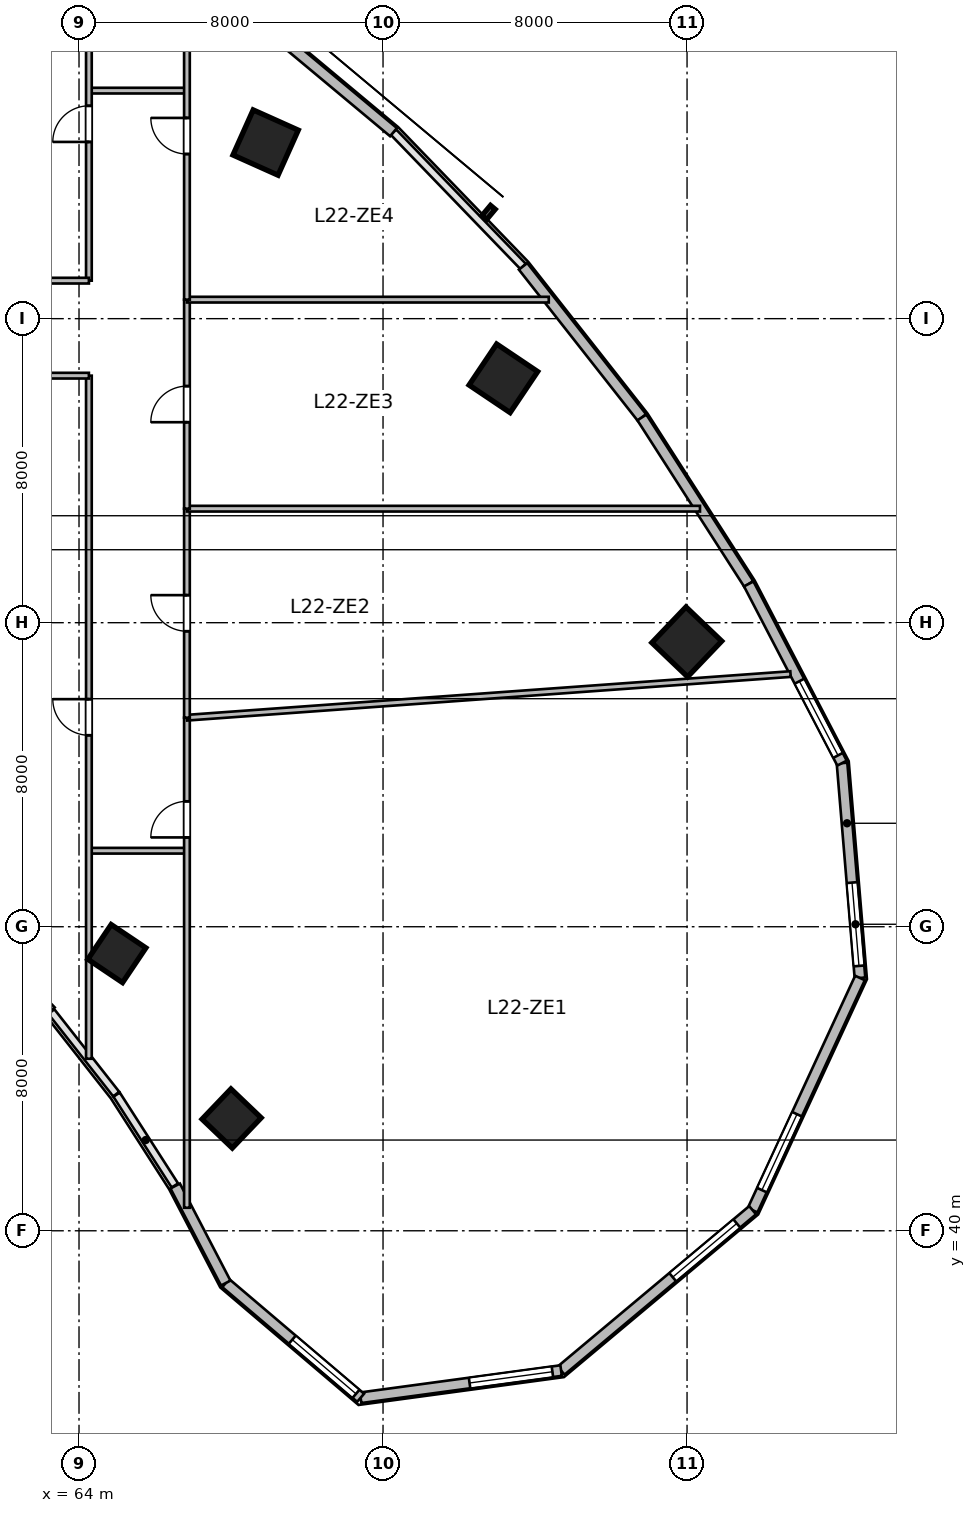
"""IFC4 building model, lengths in metres.
Left out: names, types, materials, properties, quantities, classifications, styles, units other than length and angle.
Written with IfcOpenShell. Run it as: python <this file> out.ifc"""

import sys

from ifc_helpers import new_model, si_unit, direction, frame, frame_2d, origin, origin_2d, place, context, subcontext, project, spatial, rectangle, extrude, source, transform, mapped, element, fill, save


model = new_model("IFC4")
c1 = context("Model", 3, precision=1e-05, world=origin(), true_north=direction((0.0, 1.0)))
c2 = subcontext(c1, "Body", "Model", "MODEL_VIEW")
j1 = project(units=[si_unit("LENGTHUNIT", "METRE"), si_unit("PLANEANGLEUNIT", "RADIAN")], contexts=[c1])
p1 = place(None, origin())
s1 = spatial("IfcSite", under=j1, at=p1, CompositionType="ELEMENT")
p2 = place(p1, origin())
s2 = spatial("IfcBuilding", under=s1, at=p2, CompositionType="ELEMENT")
p3 = place(p2, frame((0.0, 0.0, 96.0)))
s3 = spatial("IfcBuildingStorey", under=s2, at=p3, CompositionType="ELEMENT", Elevation=96.0)
m1 = source(origin(), c2, "Body", "SweptSolid", [
    extrude(rectangle(XDim=1.3, YDim=1.3, at=origin_2d()), origin(), (0.0, 0.0, 1.0), 3.9),
])
p4 = place(p3, frame((68.91, 68.633, 0.0), z_axis=(0.0, 0.0, 1.0), x_axis=(0.409126902895, 0.912477494148, 0.0)))
e1 = element("IfcColumn", 1, at=p4, inside=s3, PredefinedType="COLUMN", context=c2, shape_type="MappedRepresentation", body=[
    mapped(m1, transform((0.0, 0.0, 0.0), scale=1.0)),
])
m2 = source(origin(), c2, "Body", "SweptSolid", [
    extrude(rectangle(XDim=1.1, YDim=1.1, at=origin_2d()), origin(), (0.0, 0.0, 1.0), 3.9),
])
p5 = place(p3, frame((64.996, 47.294, 0.0), z_axis=(0.0, 0.0, 1.0), x_axis=(0.55774510898, 0.830012285095, 0.0)))
e2 = element("IfcColumn", 2, at=p5, inside=s3, PredefinedType="COLUMN", context=c2, shape_type="MappedRepresentation", body=[
    mapped(m2, transform((0.0, 0.0, 0.0), scale=1.0)),
])
p6 = place(p3, frame((75.167, 62.43, 0.0), z_axis=(0.0, 0.0, 1.0), x_axis=(0.55774510898, 0.830012285095, 0.0)))
e3 = element("IfcColumn", 3, at=p6, inside=s3, PredefinedType="COLUMN", context=c2, shape_type="MappedRepresentation", body=[
    mapped(m1, transform((0.0, 0.0, 0.0), scale=1.0)),
])
p7 = place(p3, frame((68.015, 42.955, 0.0), z_axis=(0.0, 0.0, 1.0), x_axis=(0.690756218984, 0.723087716626, 0.0)))
e4 = element("IfcColumn", 4, at=p7, inside=s3, PredefinedType="COLUMN", context=c2, shape_type="MappedRepresentation", body=[
    mapped(m2, transform((0.0, 0.0, 0.0), scale=1.0)),
])
p8 = place(p3, frame((79.993, 55.494, 0.0), z_axis=(0.0, 0.0, 1.0), x_axis=(0.690756218984, 0.723087716626, 0.0)))
e5 = element("IfcColumn", 5, at=p8, inside=s3, PredefinedType="COLUMN", context=c2, shape_type="MappedRepresentation", body=[
    mapped(m1, transform((0.0, 0.0, 0.0), scale=1.0)),
])
m3 = source(origin(), c2, "Body", "SweptSolid", [
    extrude(rectangle(XDim=5.674, YDim=0.28, at=frame_2d((2.837, 0.0))), origin(), (0.0, 0.0, 1.0), 3.65),
])
p9 = place(p3, frame((84.078, 52.305, 0.0), z_axis=(0.0, 0.0, 1.0), x_axis=(0.083309007867, -0.996523762491, 0.0)))
e6 = element("IfcWall", 6, at=p9, inside=s3, PredefinedType="SOLIDWALL", context=c2, shape_type="MappedRepresentation", body=[
    mapped(m3, transform((0.0, 0.0, 0.0), scale=1.0)),
])
p10 = place(p9, frame((3.155, 0.0, 0.95)))
e7 = element("IfcOpeningElement", 7, at=p10, cuts=e6, PredefinedType="OPENING", context=c2, shape_type="SweptSolid", body=[
    extrude(rectangle(XDim=2.2, YDim=2.1, at=frame_2d((1.1, 1.05))), frame((0.0, 0.15, 0.0), z_axis=(0.0, -1.0, 0.0), x_axis=(1.0, 0.0, 0.0)), (0.0, 0.0, 1.0), 0.3),
])
m4 = source(origin(), c2, "Body", "SweptSolid", [
    extrude(rectangle(XDim=6.732, YDim=0.28, at=frame_2d((3.366, 0.0))), origin(), (0.0, 0.0, 1.0), 3.65),
])
p11 = place(p3, frame((84.55, 46.652, 0.0), z_axis=(0.0, 0.0, 1.0), x_axis=(-0.419644552709, -0.907688520023, 0.0)))
e8 = element("IfcWall", 8, at=p11, inside=s3, PredefinedType="SOLIDWALL", context=c2, shape_type="MappedRepresentation", body=[
    mapped(m4, transform((0.0, 0.0, 0.0), scale=1.0)),
])
p12 = place(p11, frame((3.949, 0.0, 0.95)))
e9 = element("IfcOpeningElement", 9, at=p12, cuts=e8, PredefinedType="OPENING", context=c2, shape_type="SweptSolid", body=[
    extrude(rectangle(XDim=2.2, YDim=2.1, at=frame_2d((1.1, 1.05))), frame((0.0, 0.15, 0.0), z_axis=(0.0, -1.0, 0.0), x_axis=(1.0, 0.0, 0.0)), (0.0, 0.0, 1.0), 0.3),
])
m5 = source(origin(), c2, "Body", "SweptSolid", [
    extrude(rectangle(XDim=6.573, YDim=0.28, at=frame_2d((3.287, 0.0))), origin(), (0.0, 0.0, 1.0), 3.65),
])
p13 = place(p3, frame((81.725, 40.541, 0.0), z_axis=(0.0, 0.0, 1.0), x_axis=(-0.766715154163, -0.641987439423, 0.0)))
e10 = element("IfcWall", 10, at=p13, inside=s3, PredefinedType="SOLIDWALL", context=c2, shape_type="MappedRepresentation", body=[
    mapped(m5, transform((0.0, 0.0, 0.0), scale=1.0)),
])
p14 = place(p13, frame((0.543, 0.0, 0.95)))
e11 = element("IfcOpeningElement", 11, at=p14, cuts=e10, PredefinedType="OPENING", context=c2, shape_type="SweptSolid", body=[
    extrude(rectangle(XDim=2.2, YDim=2.1, at=frame_2d((1.1, 1.05))), frame((0.0, 0.15, 0.0), z_axis=(0.0, -1.0, 0.0), x_axis=(1.0, 0.0, 0.0)), (0.0, 0.0, 1.0), 0.3),
])
m6 = source(origin(), c2, "Body", "SweptSolid", [
    extrude(rectangle(XDim=5.324, YDim=0.28, at=frame_2d((2.662, 0.0))), origin(), (0.0, 0.0, 1.0), 3.65),
])
p15 = place(p3, frame((76.686, 36.322, 0.0), z_axis=(0.0, 0.0, 1.0), x_axis=(-0.990931467223, -0.134368252451, 0.0)))
e12 = element("IfcWall", 12, at=p15, inside=s3, PredefinedType="SOLIDWALL", context=c2, shape_type="MappedRepresentation", body=[
    mapped(m6, transform((0.0, 0.0, 0.0), scale=1.0)),
])
p16 = place(p15, frame((0.231, 0.0, 0.95)))
e13 = element("IfcOpeningElement", 13, at=p16, cuts=e12, PredefinedType="OPENING", context=c2, shape_type="SweptSolid", body=[
    extrude(rectangle(XDim=2.2, YDim=2.1, at=frame_2d((1.1, 1.05))), frame((0.0, 0.15, 0.0), z_axis=(0.0, -1.0, 0.0), x_axis=(1.0, 0.0, 0.0)), (0.0, 0.0, 1.0), 0.3),
])
m7 = source(origin(), c2, "Body", "SweptSolid", [
    extrude(rectangle(XDim=4.659, YDim=0.28, at=frame_2d((2.33, 0.0))), origin(), (0.0, 0.0, 1.0), 3.65),
])
p17 = place(p3, frame((71.41, 35.606, 0.0), z_axis=(0.0, 0.0, 1.0), x_axis=(-0.761913458795, 0.647678841176, 0.0)))
e14 = element("IfcWall", 14, at=p17, inside=s3, PredefinedType="SOLIDWALL", context=c2, shape_type="MappedRepresentation", body=[
    mapped(m7, transform((0.0, 0.0, 0.0), scale=1.0)),
])
p18 = place(p17, frame((0.16, 0.0, 0.95)))
e15 = element("IfcOpeningElement", 15, at=p18, cuts=e14, PredefinedType="OPENING", context=c2, shape_type="SweptSolid", body=[
    extrude(rectangle(XDim=2.2, YDim=2.1, at=frame_2d((1.1, 1.05))), frame((0.0, 0.15, 0.0), z_axis=(0.0, -1.0, 0.0), x_axis=(1.0, 0.0, 0.0)), (0.0, 0.0, 1.0), 0.3),
])
m8 = source(origin(), c2, "Body", "SweptSolid", [
    extrude(rectangle(XDim=2.88, YDim=0.28, at=frame_2d((1.44, 0.0))), origin(), (0.0, 0.0, 1.0), 3.65),
])
p19 = place(p3, frame((67.861, 38.624, 0.0), z_axis=(0.0, 0.0, 1.0), x_axis=(-0.461769086658, 0.887000175088, 0.0)))
e16 = element("IfcWall", 16, at=p19, inside=s3, PredefinedType="SOLIDWALL", context=c2, shape_type="MappedRepresentation", body=[
    mapped(m8, transform((0.0, 0.0, 0.0), scale=1.0)),
])
m9 = source(origin(), c2, "Body", "SweptSolid", [
    extrude(rectangle(XDim=2.68, YDim=0.28, at=frame_2d((1.34, 0.0))), origin(), (0.0, 0.0, 1.0), 3.65),
])
p20 = place(p3, frame((63.26, 45.78, 0.0), z_axis=(0.0, 0.0, 1.0), x_axis=(-0.694561996568, 0.719432855049, 0.0)))
e17 = element("IfcWall", 17, at=p20, inside=s3, PredefinedType="SOLIDWALL", context=c2, shape_type="MappedRepresentation", body=[
    mapped(m9, transform((0.0, 0.0, 0.0), scale=1.0)),
])
m10 = source(origin(), c2, "Body", "SweptSolid", [
    extrude(rectangle(XDim=4.762, YDim=0.28, at=frame_2d((2.381, 0.0))), origin(), (0.0, 0.0, 1.0), 3.65),
])
p21 = place(p3, frame((68.618, 71.958, 0.0), z_axis=(0.0, 0.0, 1.0), x_axis=(0.767952279762, -0.640507061638, 0.0)))
e18 = element("IfcWall", 18, at=p21, inside=s3, PredefinedType="SOLIDWALL", context=c2, shape_type="MappedRepresentation", body=[
    mapped(m10, transform((0.0, 0.0, 0.0), scale=1.0)),
])
m11 = source(origin(), c2, "Body", "SweptSolid", [
    extrude(rectangle(XDim=5.058, YDim=0.28, at=frame_2d((2.529, 0.0))), origin(), (0.0, 0.0, 1.0), 3.65),
])
p22 = place(p3, frame((75.685, 65.376, 0.0), z_axis=(0.0, 0.0, 1.0), x_axis=(0.618145507434, -0.786063694391, 0.0)))
e19 = element("IfcWall", 19, at=p22, inside=s3, PredefinedType="SOLIDWALL", context=c2, shape_type="MappedRepresentation", body=[
    mapped(m11, transform((0.0, 0.0, 0.0), scale=1.0)),
])
m12 = source(origin(), c2, "Body", "SweptSolid", [
    extrude(rectangle(XDim=5.205, YDim=0.28, at=frame_2d((2.603, 0.0))), origin(), (0.0, 0.0, 1.0), 3.65),
])
p23 = place(p3, frame((78.812, 61.4, 0.0), z_axis=(0.0, 0.0, 1.0), x_axis=(0.540188528895, -0.8415440293, 0.0)))
e20 = element("IfcWall", 20, at=p23, inside=s3, PredefinedType="SOLIDWALL", context=c2, shape_type="MappedRepresentation", body=[
    mapped(m12, transform((0.0, 0.0, 0.0), scale=1.0)),
])
m13 = source(origin(), c2, "Body", "SweptSolid", [
    extrude(rectangle(XDim=5.315, YDim=0.28, at=frame_2d((2.658, 0.0))), origin(), (0.0, 0.0, 1.0), 3.65),
])
p24 = place(p3, frame((81.623, 57.02, 0.0), z_axis=(0.0, 0.0, 1.0), x_axis=(0.461760527822, -0.887004630735, 0.0)))
e21 = element("IfcWall", 21, at=p24, inside=s3, PredefinedType="SOLIDWALL", context=c2, shape_type="MappedRepresentation", body=[
    mapped(m13, transform((0.0, 0.0, 0.0), scale=1.0)),
])
p25 = place(p24, frame((2.886, 0.0, 0.95)))
e22 = element("IfcOpeningElement", 22, at=p25, cuts=e21, PredefinedType="OPENING", context=c2, shape_type="SweptSolid", body=[
    extrude(rectangle(XDim=2.2, YDim=2.1, at=frame_2d((1.1, 1.05))), frame((0.0, 0.15, 0.0), z_axis=(0.0, -1.0, 0.0), x_axis=(1.0, 0.0, 0.0)), (0.0, 0.0, 1.0), 0.3),
])
m14 = source(origin(), c2, "Body", "SweptSolid", [
    extrude(rectangle(XDim=2.5, YDim=0.15, at=frame_2d((1.25, 0.0))), origin(), (0.0, 0.0, 1.0), 3.65),
])
for number, where, z_axis, x_axis in (
    (23, (64.3, 50.0, 0.0), (0.0, 0.0, 1.0), (1.0, 0.0, 0.0)),
    (24, (64.3, 70.0, 0.0), (0.0, 0.0, 1.0), (1.0, 0.0, 0.0)),
):
    element("IfcWall", number, at=place(p3, frame(where, z_axis=z_axis, x_axis=x_axis)), inside=s3, PredefinedType="PARTITIONING", context=c2, shape_type="MappedRepresentation", body=[
        mapped(m14, transform((0.0, 0.0, 0.0), scale=1.0)),
    ])
m15 = source(origin(), c2, "Body", "SweptSolid", [
    extrude(rectangle(XDim=12.894, YDim=0.15, at=frame_2d((6.447, 0.0))), origin(), (0.0, 0.0, 1.0), 2.942),
])
p26 = place(p3, frame((66.84, 40.606, 0.0), z_axis=(0.0, 0.0, 1.0), x_axis=(0.0, 1.0, 0.0)))
e25 = element("IfcWall", 25, at=p26, inside=s3, PredefinedType="PARTITIONING", context=c2, shape_type="MappedRepresentation", body=[
    mapped(m15, transform((0.0, 0.0, 0.0), scale=1.0)),
])
p27 = place(p26, frame((9.744, 0.0, 0.0)))
e26 = element("IfcOpeningElement", 26, at=p27, cuts=e25, PredefinedType="OPENING", context=c2, shape_type="SweptSolid", body=[
    extrude(rectangle(XDim=0.95, YDim=2.1, at=frame_2d((0.475, 1.05))), frame((0.0, 0.085, 0.0), z_axis=(0.0, -1.0, 0.0), x_axis=(1.0, 0.0, 0.0)), (0.0, 0.0, 1.0), 0.17),
])
m16 = source(origin(), c2, "Body", "SweptSolid", [
    extrude(rectangle(XDim=15.924, YDim=0.15, at=frame_2d((7.962, 0.0))), origin(), (0.0, 0.0, 1.0), 3.65),
])
p28 = place(p3, frame((66.84, 53.5, 0.0), z_axis=(0.0, 0.0, 1.0), x_axis=(0.997397082693, 0.072104503572, 0.0)))
e27 = element("IfcWall", 27, at=p28, inside=s3, PredefinedType="PARTITIONING", context=c2, shape_type="MappedRepresentation", body=[
    mapped(m16, transform((0.0, 0.0, 0.0), scale=1.0)),
])
m17 = source(origin(), c2, "Body", "SweptSolid", [
    extrude(rectangle(XDim=5.5, YDim=0.15, at=frame_2d((2.75, 0.0))), origin(), (0.0, 0.0, 1.0), 3.022),
])
p29 = place(p3, frame((66.84, 53.5, 0.0), z_axis=(0.0, 0.0, 1.0), x_axis=(0.0, 1.0, 0.0)))
e28 = element("IfcWall", 28, at=p29, inside=s3, PredefinedType="PARTITIONING", context=c2, shape_type="MappedRepresentation", body=[
    mapped(m17, transform((0.0, 0.0, 0.0), scale=1.0)),
])
p30 = place(p29, frame((2.275, 0.0, 0.0)))
e29 = element("IfcOpeningElement", 29, at=p30, cuts=e28, PredefinedType="OPENING", context=c2, shape_type="SweptSolid", body=[
    extrude(rectangle(XDim=0.95, YDim=2.1, at=frame_2d((0.475, 1.05))), frame((0.0, 0.085, 0.0), z_axis=(0.0, -1.0, 0.0), x_axis=(1.0, 0.0, 0.0)), (0.0, 0.0, 1.0), 0.17),
])
m18 = source(origin(), c2, "Body", "SweptSolid", [
    extrude(rectangle(XDim=13.5, YDim=0.15, at=frame_2d((6.75, 0.0))), origin(), (0.0, 0.0, 1.0), 3.65),
])
p31 = place(p3, frame((66.84, 59.0, 0.0), z_axis=(0.0, 0.0, 1.0), x_axis=(1.0, 0.0, 0.0)))
e30 = element("IfcWall", 30, at=p31, inside=s3, PredefinedType="PARTITIONING", context=c2, shape_type="MappedRepresentation", body=[
    mapped(m18, transform((0.0, 0.0, 0.0), scale=1.0)),
])
m19 = source(origin(), c2, "Body", "SweptSolid", [
    extrude(rectangle(XDim=5.5, YDim=0.15, at=frame_2d((2.75, 0.0))), origin(), (0.0, 0.0, 1.0), 2.942),
])
p32 = place(p3, frame((66.84, 59.0, 0.0), z_axis=(0.0, 0.0, 1.0), x_axis=(0.0, 1.0, 0.0)))
e31 = element("IfcWall", 31, at=p32, inside=s3, PredefinedType="PARTITIONING", context=c2, shape_type="MappedRepresentation", body=[
    mapped(m19, transform((0.0, 0.0, 0.0), scale=1.0)),
])
p33 = place(p32, frame((2.275, 0.0, 0.0)))
e32 = element("IfcOpeningElement", 32, at=p33, cuts=e31, PredefinedType="OPENING", context=c2, shape_type="SweptSolid", body=[
    extrude(rectangle(XDim=0.95, YDim=2.1, at=frame_2d((0.475, 1.05))), frame((0.0, 0.085, 0.0), z_axis=(0.0, -1.0, 0.0), x_axis=(1.0, 0.0, 0.0)), (0.0, 0.0, 1.0), 0.17),
])
m20 = source(origin(), c2, "Body", "SweptSolid", [
    extrude(rectangle(XDim=9.521, YDim=0.15, at=frame_2d((4.761, 0.0))), origin(), (0.0, 0.0, 1.0), 3.65),
])
p34 = place(p3, frame((66.84, 64.5, 0.0), z_axis=(0.0, 0.0, 1.0), x_axis=(1.0, 0.0, 0.0)))
e33 = element("IfcWall", 33, at=p34, inside=s3, PredefinedType="PARTITIONING", context=c2, shape_type="MappedRepresentation", body=[
    mapped(m20, transform((0.0, 0.0, 0.0), scale=1.0)),
])
m21 = source(origin(), c2, "Body", "SweptSolid", [
    extrude(rectangle(XDim=8.613, YDim=0.15, at=frame_2d((4.307, 0.0))), origin(), (0.0, 0.0, 1.0), 3.65),
])
p35 = place(p3, frame((66.84, 64.5, 0.0), z_axis=(0.0, 0.0, 1.0), x_axis=(0.0, 1.0, 0.0)))
e34 = element("IfcWall", 34, at=p35, inside=s3, PredefinedType="PARTITIONING", context=c2, shape_type="MappedRepresentation", body=[
    mapped(m21, transform((0.0, 0.0, 0.0), scale=1.0)),
])
p36 = place(p35, frame((3.832, 0.0, 0.0)))
e35 = element("IfcOpeningElement", 35, at=p36, cuts=e34, PredefinedType="OPENING", context=c2, shape_type="SweptSolid", body=[
    extrude(rectangle(XDim=0.95, YDim=2.1, at=frame_2d((0.475, 1.05))), frame((0.0, 0.085, 0.0), z_axis=(0.0, -1.0, 0.0), x_axis=(1.0, 0.0, 0.0)), (0.0, 0.0, 1.0), 0.17),
])
m22 = source(origin(), c2, "Body", "SweptSolid", [
    extrude(rectangle(XDim=17.974, YDim=0.15, at=frame_2d((8.987, 0.0))), origin(), (0.0, 0.0, 1.0), 2.942),
])
p37 = place(p3, frame((64.26, 44.526, 0.0), z_axis=(0.0, 0.0, 1.0), x_axis=(0.0, 1.0, 0.0)))
e36 = element("IfcWall", 36, at=p37, inside=s3, PredefinedType="PARTITIONING", context=c2, shape_type="MappedRepresentation", body=[
    mapped(m22, transform((0.0, 0.0, 0.0), scale=1.0)),
])
p38 = place(p37, frame((8.512, 0.0, 0.0)))
e37 = element("IfcOpeningElement", 37, at=p38, cuts=e36, PredefinedType="OPENING", context=c2, shape_type="SweptSolid", body=[
    extrude(rectangle(XDim=0.95, YDim=2.1, at=frame_2d((0.475, 1.05))), frame((0.0, 0.085, 0.0), z_axis=(0.0, -1.0, 0.0), x_axis=(1.0, 0.0, 0.0)), (0.0, 0.0, 1.0), 0.17),
])
m23 = source(origin(), c2, "Body", "SweptSolid", [
    extrude(rectangle(XDim=4.76, YDim=0.15, at=frame_2d((2.38, 0.0))), origin(), (0.0, 0.0, 1.0), 3.65),
])
p39 = place(p3, frame((59.5, 62.5, 0.0), z_axis=(0.0, 0.0, 1.0), x_axis=(1.0, 0.0, 0.0)))
e38 = element("IfcWall", 38, at=p39, inside=s3, PredefinedType="PARTITIONING", context=c2, shape_type="MappedRepresentation", body=[
    mapped(m23, transform((0.0, 0.0, 0.0), scale=1.0)),
])
m24 = source(origin(), c2, "Body", "SweptSolid", [
    extrude(rectangle(XDim=9.729, YDim=0.15, at=frame_2d((4.864, 0.0))), origin(), (0.0, 0.0, 1.0), 3.65),
])
p40 = place(p3, frame((64.26, 65.0, 0.0), z_axis=(0.0, 0.0, 1.0), x_axis=(0.0, 1.0, 0.0)))
e39 = element("IfcWall", 39, at=p40, inside=s3, PredefinedType="PARTITIONING", context=c2, shape_type="MappedRepresentation", body=[
    mapped(m24, transform((0.0, 0.0, 0.0), scale=1.0)),
])
p41 = place(p40, frame((3.65, 0.0, 0.0)))
e40 = element("IfcOpeningElement", 40, at=p41, cuts=e39, PredefinedType="OPENING", context=c2, shape_type="SweptSolid", body=[
    extrude(rectangle(XDim=0.95, YDim=2.1, at=frame_2d((0.475, 1.05))), frame((0.0, 0.085, 0.0), z_axis=(0.0, -1.0, 0.0), x_axis=(1.0, 0.0, 0.0)), (0.0, 0.0, 1.0), 0.17),
])
m25 = source(origin(), c2, "Body", "SweptSolid", [
    extrude(rectangle(XDim=2.66, YDim=0.15, at=frame_2d((1.33, 0.0))), origin(), (0.0, 0.0, 1.0), 3.65),
])
p42 = place(p3, frame((61.6, 65.0, 0.0), z_axis=(0.0, 0.0, 1.0), x_axis=(1.0, 0.0, 0.0)))
e41 = element("IfcWall", 41, at=p42, inside=s3, PredefinedType="PARTITIONING", context=c2, shape_type="MappedRepresentation", body=[
    mapped(m25, transform((0.0, 0.0, 0.0), scale=1.0)),
])
m26 = source(origin(), c2, "Body", "SweptSolid", [
    extrude(rectangle(XDim=2.2, YDim=2.1, at=frame_2d((1.1, 1.05))), frame((0.0, 0.03, 0.0), z_axis=(0.0, -1.0, 0.0), x_axis=(1.0, 0.0, 0.0)), (0.0, 0.0, 1.0), 0.06),
])
p43 = place(p10, origin())
e42 = element("IfcWindow", 42, at=p43, inside=s3, PartitioningType="TRIPLE_PANEL_VERTICAL", PredefinedType="WINDOW", context=c2, shape_type="MappedRepresentation", body=[
    mapped(m26, transform((0.0, 0.0, 0.0), scale=1.0)),
])
fill(e7, e42)
p44 = place(p12, origin())
e43 = element("IfcWindow", 43, at=p44, inside=s3, PartitioningType="TRIPLE_PANEL_VERTICAL", PredefinedType="WINDOW", context=c2, shape_type="MappedRepresentation", body=[
    mapped(m26, transform((0.0, 0.0, 0.0), scale=1.0)),
])
fill(e9, e43)
p45 = place(p14, origin())
e44 = element("IfcWindow", 44, at=p45, inside=s3, PartitioningType="TRIPLE_PANEL_VERTICAL", PredefinedType="WINDOW", context=c2, shape_type="MappedRepresentation", body=[
    mapped(m26, transform((0.0, 0.0, 0.0), scale=1.0)),
])
fill(e11, e44)
p46 = place(p16, origin())
e45 = element("IfcWindow", 45, at=p46, inside=s3, PartitioningType="TRIPLE_PANEL_VERTICAL", PredefinedType="WINDOW", context=c2, shape_type="MappedRepresentation", body=[
    mapped(m26, transform((0.0, 0.0, 0.0), scale=1.0)),
])
fill(e13, e45)
p47 = place(p18, origin())
e46 = element("IfcWindow", 46, at=p47, inside=s3, PartitioningType="TRIPLE_PANEL_VERTICAL", PredefinedType="WINDOW", context=c2, shape_type="MappedRepresentation", body=[
    mapped(m26, transform((0.0, 0.0, 0.0), scale=1.0)),
])
fill(e15, e46)
p48 = place(p25, origin())
e47 = element("IfcWindow", 47, at=p48, inside=s3, PartitioningType="TRIPLE_PANEL_VERTICAL", PredefinedType="WINDOW", context=c2, shape_type="MappedRepresentation", body=[
    mapped(m26, transform((0.0, 0.0, 0.0), scale=1.0)),
])
fill(e22, e47)
m27 = source(origin(), c2, "Body", "SweptSolid", [
    extrude(rectangle(XDim=0.95, YDim=2.1, at=frame_2d((0.475, 1.05))), frame((0.0, 0.025, 0.0), z_axis=(0.0, -1.0, 0.0), x_axis=(1.0, 0.0, 0.0)), (0.0, 0.0, 1.0), 0.05),
])
p49 = place(p27, origin())
e48 = element("IfcDoor", 48, at=p49, inside=s3, OperationType="SINGLE_SWING_LEFT", PredefinedType="DOOR", context=c2, shape_type="MappedRepresentation", body=[
    mapped(m27, transform((0.0, 0.0, 0.0), scale=1.0)),
])
fill(e26, e48)
p50 = place(p30, origin())
e49 = element("IfcDoor", 49, at=p50, inside=s3, OperationType="SINGLE_SWING_RIGHT", PredefinedType="DOOR", context=c2, shape_type="MappedRepresentation", body=[
    mapped(m27, transform((0.0, 0.0, 0.0), scale=1.0)),
])
fill(e29, e49)
p51 = place(p33, origin())
e50 = element("IfcDoor", 50, at=p51, inside=s3, OperationType="SINGLE_SWING_LEFT", PredefinedType="DOOR", context=c2, shape_type="MappedRepresentation", body=[
    mapped(m27, transform((0.0, 0.0, 0.0), scale=1.0)),
])
fill(e32, e50)
p52 = place(p36, origin())
e51 = element("IfcDoor", 51, at=p52, inside=s3, OperationType="SINGLE_SWING_RIGHT", PredefinedType="DOOR", context=c2, shape_type="MappedRepresentation", body=[
    mapped(m27, transform((0.0, 0.0, 0.0), scale=1.0)),
])
fill(e35, e51)
p53 = place(p38, origin())
e52 = element("IfcDoor", 52, at=p53, inside=s3, OperationType="SINGLE_SWING_RIGHT", PredefinedType="DOOR", context=c2, shape_type="MappedRepresentation", body=[
    mapped(m27, transform((0.0, 0.0, 0.0), scale=1.0)),
])
fill(e37, e52)
p54 = place(p41, origin())
e53 = element("IfcDoor", 53, at=p54, inside=s3, OperationType="SINGLE_SWING_LEFT", PredefinedType="DOOR", context=c2, shape_type="MappedRepresentation", body=[
    mapped(m27, transform((0.0, 0.0, 0.0), scale=1.0)),
])
fill(e40, e53)
save(model, sys.argv[1])
